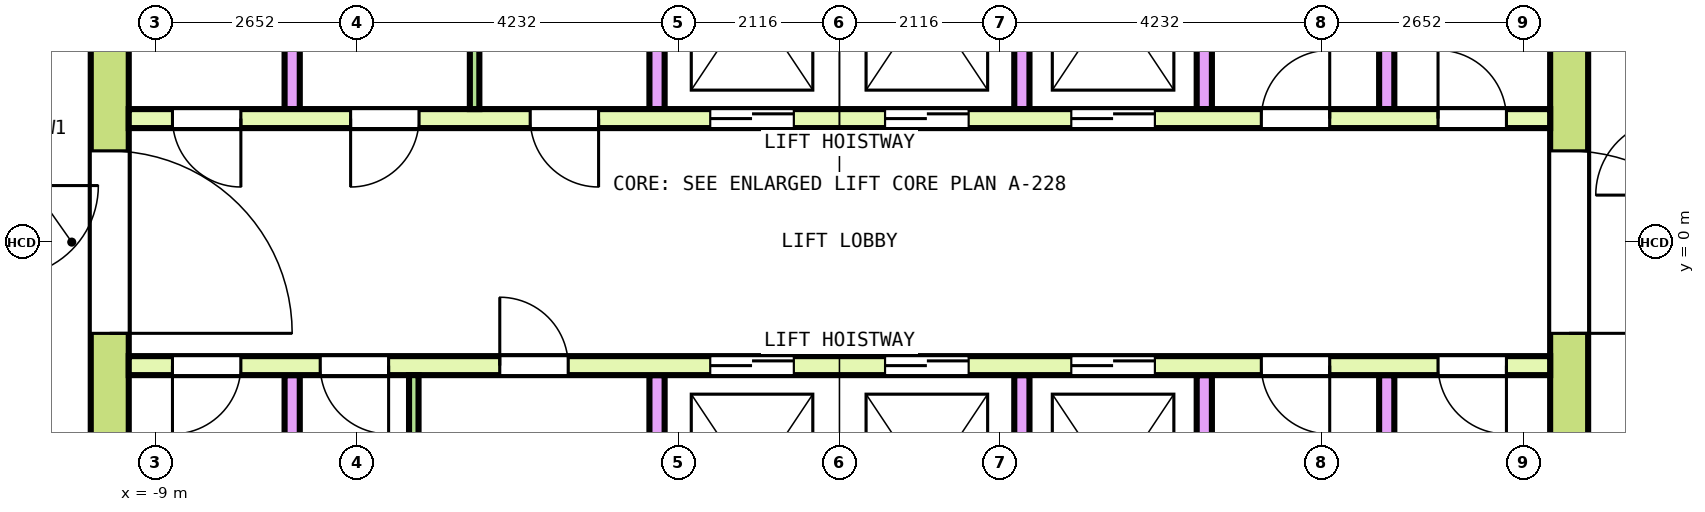
"""IFC4 building model, lengths in metres.
Left out: names, types, materials, properties, quantities, classifications, styles, units other than length and angle.
Written with IfcOpenShell. Run it as: python <this file> out.ifc"""

import sys

from ifc_helpers import new_model, si_unit, direction, frame, frame_2d, origin, place, context, subcontext, project, spatial, rectangle, extrude, element, fill, save


model = new_model("IFC4")
c1 = context("Model", 3, precision=1e-05, world=origin(), true_north=direction((0.0, 1.0)))
c2 = subcontext(c1, "Body", "Model", "MODEL_VIEW")
j1 = project(units=[si_unit("LENGTHUNIT", "METRE"), si_unit("PLANEANGLEUNIT", "RADIAN")], contexts=[c1])
p1 = place(None, origin())
s1 = spatial("IfcSite", under=j1, at=p1, CompositionType="ELEMENT")
p2 = place(p1, origin())
s2 = spatial("IfcBuilding", under=s1, at=p2, CompositionType="ELEMENT")
p3 = place(p2, frame((0.0, 0.0, 328.6)))
s3 = spatial("IfcBuildingStorey", under=s2, at=p3, CompositionType="ELEMENT", Elevation=328.6)
p4 = place(p3, frame((-9.6, -7.85, 0.0), z_axis=(0.0, 0.0, 1.0), x_axis=(0.0, 1.0, 0.0)))
e1 = element("IfcWall", 1, at=p4, inside=s3, PredefinedType="SHEAR", context=c2, shape_type="SweptSolid", body=[
    extrude(rectangle(XDim=15.7, YDim=0.5, at=frame_2d((7.85, 0.0))), origin(), (0.0, 0.0, 1.0), 3.7),
])
p5 = place(p4, frame((6.65, 0.0, 0.0)))
e2 = element("IfcOpeningElement", 2, at=p5, cuts=e1, PredefinedType="OPENING", context=c2, shape_type="SweptSolid", body=[
    extrude(rectangle(XDim=2.4, YDim=2.1, at=frame_2d((1.2, 1.05))), frame((0.0, 0.26, 0.0), z_axis=(0.0, -1.0, 0.0), x_axis=(1.0, 0.0, 0.0)), (0.0, 0.0, 1.0), 0.52),
])
p6 = place(p4, frame((13.55, 0.0, 0.0)))
e3 = element("IfcOpeningElement", 3, at=p6, cuts=e1, PredefinedType="OPENING", context=c2, shape_type="SweptSolid", body=[
    extrude(rectangle(XDim=1.2, YDim=2.1, at=frame_2d((0.6, 1.05))), frame((0.0, 0.26, 0.0), z_axis=(0.0, -1.0, 0.0), x_axis=(1.0, 0.0, 0.0)), (0.0, 0.0, 1.0), 0.52),
])
p7 = place(p4, frame((0.95, 0.0, 0.0)))
e4 = element("IfcOpeningElement", 4, at=p7, cuts=e1, PredefinedType="OPENING", context=c2, shape_type="SweptSolid", body=[
    extrude(rectangle(XDim=1.2, YDim=2.1, at=frame_2d((0.6, 1.05))), frame((0.0, 0.26, 0.0), z_axis=(0.0, -1.0, 0.0), x_axis=(1.0, 0.0, 0.0)), (0.0, 0.0, 1.0), 0.52),
])
p8 = place(p3, frame((9.6, -7.85, 0.0), z_axis=(0.0, 0.0, 1.0), x_axis=(0.0, 1.0, 0.0)))
e5 = element("IfcWall", 5, at=p8, inside=s3, PredefinedType="SHEAR", context=c2, shape_type="SweptSolid", body=[
    extrude(rectangle(XDim=15.7, YDim=0.5, at=frame_2d((7.85, 0.0))), origin(), (0.0, 0.0, 1.0), 3.7),
])
p9 = place(p8, frame((6.65, 0.0, 0.0)))
e6 = element("IfcOpeningElement", 6, at=p9, cuts=e5, PredefinedType="OPENING", context=c2, shape_type="SweptSolid", body=[
    extrude(rectangle(XDim=2.4, YDim=2.1, at=frame_2d((1.2, 1.05))), frame((0.0, 0.26, 0.0), z_axis=(0.0, -1.0, 0.0), x_axis=(1.0, 0.0, 0.0)), (0.0, 0.0, 1.0), 0.52),
])
p10 = place(p8, frame((13.55, 0.0, 0.0)))
e7 = element("IfcOpeningElement", 7, at=p10, cuts=e5, PredefinedType="OPENING", context=c2, shape_type="SweptSolid", body=[
    extrude(rectangle(XDim=1.2, YDim=2.1, at=frame_2d((0.6, 1.05))), frame((0.0, 0.26, 0.0), z_axis=(0.0, -1.0, 0.0), x_axis=(1.0, 0.0, 0.0)), (0.0, 0.0, 1.0), 0.52),
])
p11 = place(p8, frame((1.05, 0.0, 0.0)))
e8 = element("IfcOpeningElement", 8, at=p11, cuts=e5, PredefinedType="OPENING", context=c2, shape_type="SweptSolid", body=[
    extrude(rectangle(XDim=1.0, YDim=2.1, at=frame_2d((0.5, 1.05))), frame((0.0, 0.26, 0.0), z_axis=(0.0, -1.0, 0.0), x_axis=(1.0, 0.0, 0.0)), (0.0, 0.0, 1.0), 0.52),
])
p12 = place(p3, frame((-9.35, 1.625, 0.0), z_axis=(0.0, 0.0, 1.0), x_axis=(1.0, 0.0, 0.0)))
e9 = element("IfcWall", 9, at=p12, inside=s3, PredefinedType="SOLIDWALL", context=c2, shape_type="SweptSolid", body=[
    extrude(rectangle(XDim=18.7, YDim=0.25, at=frame_2d((9.35, 0.0))), origin(), (0.0, 0.0, 1.0), 3.7),
])
p13 = place(p12, frame((7.65, 0.0, 0.0)))
e10 = element("IfcOpeningElement", 10, at=p13, cuts=e9, PredefinedType="OPENING", context=c2, shape_type="SweptSolid", body=[
    extrude(rectangle(XDim=1.1, YDim=2.1, at=frame_2d((0.55, 1.05))), frame((0.0, 0.135, 0.0), z_axis=(0.0, -1.0, 0.0), x_axis=(1.0, 0.0, 0.0)), (0.0, 0.0, 1.0), 0.27),
])
p14 = place(p12, frame((9.95, 0.0, 0.0)))
e11 = element("IfcOpeningElement", 11, at=p14, cuts=e9, PredefinedType="OPENING", context=c2, shape_type="SweptSolid", body=[
    extrude(rectangle(XDim=1.1, YDim=2.1, at=frame_2d((0.55, 1.05))), frame((0.0, 0.135, 0.0), z_axis=(0.0, -1.0, 0.0), x_axis=(1.0, 0.0, 0.0)), (0.0, 0.0, 1.0), 0.27),
])
p15 = place(p12, frame((12.4, 0.0, 0.0)))
e12 = element("IfcOpeningElement", 12, at=p15, cuts=e9, PredefinedType="OPENING", context=c2, shape_type="SweptSolid", body=[
    extrude(rectangle(XDim=1.1, YDim=2.1, at=frame_2d((0.55, 1.05))), frame((0.0, 0.135, 0.0), z_axis=(0.0, -1.0, 0.0), x_axis=(1.0, 0.0, 0.0)), (0.0, 0.0, 1.0), 0.27),
])
p16 = place(p12, frame((0.575, 0.0, 0.0)))
e13 = element("IfcOpeningElement", 13, at=p16, cuts=e9, PredefinedType="OPENING", context=c2, shape_type="SweptSolid", body=[
    extrude(rectangle(XDim=0.9, YDim=2.1, at=frame_2d((0.45, 1.05))), frame((0.0, 0.135, 0.0), z_axis=(0.0, -1.0, 0.0), x_axis=(1.0, 0.0, 0.0)), (0.0, 0.0, 1.0), 0.27),
])
p17 = place(p12, frame((2.919, 0.0, 0.0)))
e14 = element("IfcOpeningElement", 14, at=p17, cuts=e9, PredefinedType="OPENING", context=c2, shape_type="SweptSolid", body=[
    extrude(rectangle(XDim=0.9, YDim=2.1, at=frame_2d((0.45, 1.05))), frame((0.0, 0.135, 0.0), z_axis=(0.0, -1.0, 0.0), x_axis=(1.0, 0.0, 0.0)), (0.0, 0.0, 1.0), 0.27),
])
p18 = place(p12, frame((5.281, 0.0, 0.0)))
e15 = element("IfcOpeningElement", 15, at=p18, cuts=e9, PredefinedType="OPENING", context=c2, shape_type="SweptSolid", body=[
    extrude(rectangle(XDim=0.9, YDim=2.1, at=frame_2d((0.45, 1.05))), frame((0.0, 0.135, 0.0), z_axis=(0.0, -1.0, 0.0), x_axis=(1.0, 0.0, 0.0)), (0.0, 0.0, 1.0), 0.27),
])
p19 = place(p12, frame((14.9, 0.0, 0.0)))
e16 = element("IfcOpeningElement", 16, at=p19, cuts=e9, PredefinedType="OPENING", context=c2, shape_type="SweptSolid", body=[
    extrude(rectangle(XDim=0.9, YDim=2.1, at=frame_2d((0.45, 1.05))), frame((0.0, 0.135, 0.0), z_axis=(0.0, -1.0, 0.0), x_axis=(1.0, 0.0, 0.0)), (0.0, 0.0, 1.0), 0.27),
])
p20 = place(p12, frame((17.225, 0.0, 0.0)))
e17 = element("IfcOpeningElement", 17, at=p20, cuts=e9, PredefinedType="OPENING", context=c2, shape_type="SweptSolid", body=[
    extrude(rectangle(XDim=0.9, YDim=2.1, at=frame_2d((0.45, 1.05))), frame((0.0, 0.135, 0.0), z_axis=(0.0, -1.0, 0.0), x_axis=(1.0, 0.0, 0.0)), (0.0, 0.0, 1.0), 0.27),
])
for number, where, z_axis, x_axis in (
    (18, (-7.2, 1.75, 0.0), (0.0, 0.0, 1.0), (0.0, 1.0, 0.0)),
    (19, (-2.4, 1.75, 0.0), (0.0, 0.0, 1.0), (0.0, 1.0, 0.0)),
    (20, (2.4, 1.75, 0.0), (0.0, 0.0, 1.0), (0.0, 1.0, 0.0)),
    (21, (4.8, 1.75, 0.0), (0.0, 0.0, 1.0), (0.0, 1.0, 0.0)),
    (22, (7.2, 1.75, 0.0), (0.0, 0.0, 1.0), (0.0, 1.0, 0.0)),
):
    element("IfcWall", number, at=place(p3, frame(where, z_axis=z_axis, x_axis=x_axis)), inside=s3, PredefinedType="SOLIDWALL", context=c2, shape_type="SweptSolid", body=[
        extrude(rectangle(XDim=2.9, YDim=0.2, at=frame_2d((1.45, 0.0))), origin(), (0.0, 0.0, 1.0), 3.7),
    ])
p21 = place(p3, frame((-9.35, -1.625, 0.0), z_axis=(0.0, 0.0, 1.0), x_axis=(1.0, 0.0, 0.0)))
e23 = element("IfcWall", 23, at=p21, inside=s3, PredefinedType="SOLIDWALL", context=c2, shape_type="SweptSolid", body=[
    extrude(rectangle(XDim=18.7, YDim=0.25, at=frame_2d((9.35, 0.0))), origin(), (0.0, 0.0, 1.0), 3.7),
])
p22 = place(p21, frame((7.65, 0.0, 0.0)))
e24 = element("IfcOpeningElement", 24, at=p22, cuts=e23, PredefinedType="OPENING", context=c2, shape_type="SweptSolid", body=[
    extrude(rectangle(XDim=1.1, YDim=2.1, at=frame_2d((0.55, 1.05))), frame((0.0, 0.135, 0.0), z_axis=(0.0, -1.0, 0.0), x_axis=(1.0, 0.0, 0.0)), (0.0, 0.0, 1.0), 0.27),
])
p23 = place(p21, frame((9.95, 0.0, 0.0)))
e25 = element("IfcOpeningElement", 25, at=p23, cuts=e23, PredefinedType="OPENING", context=c2, shape_type="SweptSolid", body=[
    extrude(rectangle(XDim=1.1, YDim=2.1, at=frame_2d((0.55, 1.05))), frame((0.0, 0.135, 0.0), z_axis=(0.0, -1.0, 0.0), x_axis=(1.0, 0.0, 0.0)), (0.0, 0.0, 1.0), 0.27),
])
p24 = place(p21, frame((12.4, 0.0, 0.0)))
e26 = element("IfcOpeningElement", 26, at=p24, cuts=e23, PredefinedType="OPENING", context=c2, shape_type="SweptSolid", body=[
    extrude(rectangle(XDim=1.1, YDim=2.1, at=frame_2d((0.55, 1.05))), frame((0.0, 0.135, 0.0), z_axis=(0.0, -1.0, 0.0), x_axis=(1.0, 0.0, 0.0)), (0.0, 0.0, 1.0), 0.27),
])
p25 = place(p21, frame((0.575, 0.0, 0.0)))
e27 = element("IfcOpeningElement", 27, at=p25, cuts=e23, PredefinedType="OPENING", context=c2, shape_type="SweptSolid", body=[
    extrude(rectangle(XDim=0.9, YDim=2.1, at=frame_2d((0.45, 1.05))), frame((0.0, 0.135, 0.0), z_axis=(0.0, -1.0, 0.0), x_axis=(1.0, 0.0, 0.0)), (0.0, 0.0, 1.0), 0.27),
])
p26 = place(p21, frame((2.519, 0.0, 0.0)))
e28 = element("IfcOpeningElement", 28, at=p26, cuts=e23, PredefinedType="OPENING", context=c2, shape_type="SweptSolid", body=[
    extrude(rectangle(XDim=0.9, YDim=2.1, at=frame_2d((0.45, 1.05))), frame((0.0, 0.135, 0.0), z_axis=(0.0, -1.0, 0.0), x_axis=(1.0, 0.0, 0.0)), (0.0, 0.0, 1.0), 0.27),
])
p27 = place(p21, frame((4.881, 0.0, 0.0)))
e29 = element("IfcOpeningElement", 29, at=p27, cuts=e23, PredefinedType="OPENING", context=c2, shape_type="SweptSolid", body=[
    extrude(rectangle(XDim=0.9, YDim=2.1, at=frame_2d((0.45, 1.05))), frame((0.0, 0.135, 0.0), z_axis=(0.0, -1.0, 0.0), x_axis=(1.0, 0.0, 0.0)), (0.0, 0.0, 1.0), 0.27),
])
p28 = place(p21, frame((14.9, 0.0, 0.0)))
e30 = element("IfcOpeningElement", 30, at=p28, cuts=e23, PredefinedType="OPENING", context=c2, shape_type="SweptSolid", body=[
    extrude(rectangle(XDim=0.9, YDim=2.1, at=frame_2d((0.45, 1.05))), frame((0.0, 0.135, 0.0), z_axis=(0.0, -1.0, 0.0), x_axis=(1.0, 0.0, 0.0)), (0.0, 0.0, 1.0), 0.27),
])
p29 = place(p21, frame((17.225, 0.0, 0.0)))
e31 = element("IfcOpeningElement", 31, at=p29, cuts=e23, PredefinedType="OPENING", context=c2, shape_type="SweptSolid", body=[
    extrude(rectangle(XDim=0.9, YDim=2.1, at=frame_2d((0.45, 1.05))), frame((0.0, 0.135, 0.0), z_axis=(0.0, -1.0, 0.0), x_axis=(1.0, 0.0, 0.0)), (0.0, 0.0, 1.0), 0.27),
])
for number, where, z_axis, x_axis in (
    (32, (-7.2, -4.65, 0.0), (0.0, 0.0, 1.0), (0.0, 1.0, 0.0)),
    (33, (-2.4, -4.65, 0.0), (0.0, 0.0, 1.0), (0.0, 1.0, 0.0)),
    (34, (2.4, -4.65, 0.0), (0.0, 0.0, 1.0), (0.0, 1.0, 0.0)),
    (35, (4.8, -4.65, 0.0), (0.0, 0.0, 1.0), (0.0, 1.0, 0.0)),
    (36, (7.2, -4.65, 0.0), (0.0, 0.0, 1.0), (0.0, 1.0, 0.0)),
):
    element("IfcWall", number, at=place(p3, frame(where, z_axis=z_axis, x_axis=x_axis)), inside=s3, PredefinedType="SOLIDWALL", context=c2, shape_type="SweptSolid", body=[
        extrude(rectangle(XDim=2.9, YDim=0.2, at=frame_2d((1.45, 0.0))), origin(), (0.0, 0.0, 1.0), 3.7),
    ])
for number, where, z_axis, x_axis in (
    (37, (-4.8, 1.75, 0.0), (0.0, 0.0, 1.0), (0.0, 1.0, 0.0)),
    (38, (-5.6, -4.65, 0.0), (0.0, 0.0, 1.0), (0.0, 1.0, 0.0)),
):
    element("IfcWall", number, at=place(p3, frame(where, z_axis=z_axis, x_axis=x_axis)), inside=s3, PredefinedType="PARTITIONING", context=c2, shape_type="SweptSolid", body=[
        extrude(rectangle(XDim=2.9, YDim=0.125, at=frame_2d((1.45, 0.0))), origin(), (0.0, 0.0, 1.0), 3.7),
    ])
p30 = place(p13, origin())
e39 = element("IfcDoor", 39, at=p30, inside=s3, OperationType="DOUBLE_DOOR_SLIDING", PredefinedType="DOOR", context=c2, shape_type="SweptSolid", body=[
    extrude(rectangle(XDim=1.1, YDim=2.1, at=frame_2d((0.55, 1.05))), frame((0.0, 0.075, 0.0), z_axis=(0.0, -1.0, 0.0), x_axis=(1.0, 0.0, 0.0)), (0.0, 0.0, 1.0), 0.15),
])
fill(e10, e39)
p31 = place(p14, origin())
e40 = element("IfcDoor", 40, at=p31, inside=s3, OperationType="DOUBLE_DOOR_SLIDING", PredefinedType="DOOR", context=c2, shape_type="SweptSolid", body=[
    extrude(rectangle(XDim=1.1, YDim=2.1, at=frame_2d((0.55, 1.05))), frame((0.0, 0.075, 0.0), z_axis=(0.0, -1.0, 0.0), x_axis=(1.0, 0.0, 0.0)), (0.0, 0.0, 1.0), 0.15),
])
fill(e11, e40)
p32 = place(p15, origin())
e41 = element("IfcDoor", 41, at=p32, inside=s3, OperationType="DOUBLE_DOOR_SLIDING", PredefinedType="DOOR", context=c2, shape_type="SweptSolid", body=[
    extrude(rectangle(XDim=1.1, YDim=2.1, at=frame_2d((0.55, 1.05))), frame((0.0, 0.075, 0.0), z_axis=(0.0, -1.0, 0.0), x_axis=(1.0, 0.0, 0.0)), (0.0, 0.0, 1.0), 0.15),
])
fill(e12, e41)
p33 = place(p22, origin())
e42 = element("IfcDoor", 42, at=p33, inside=s3, OperationType="DOUBLE_DOOR_SLIDING", PredefinedType="DOOR", context=c2, shape_type="SweptSolid", body=[
    extrude(rectangle(XDim=1.1, YDim=2.1, at=frame_2d((0.55, 1.05))), frame((0.0, 0.075, 0.0), z_axis=(0.0, -1.0, 0.0), x_axis=(1.0, 0.0, 0.0)), (0.0, 0.0, 1.0), 0.15),
])
fill(e24, e42)
p34 = place(p23, origin())
e43 = element("IfcDoor", 43, at=p34, inside=s3, OperationType="DOUBLE_DOOR_SLIDING", PredefinedType="DOOR", context=c2, shape_type="SweptSolid", body=[
    extrude(rectangle(XDim=1.1, YDim=2.1, at=frame_2d((0.55, 1.05))), frame((0.0, 0.075, 0.0), z_axis=(0.0, -1.0, 0.0), x_axis=(1.0, 0.0, 0.0)), (0.0, 0.0, 1.0), 0.15),
])
fill(e25, e43)
p35 = place(p24, origin())
e44 = element("IfcDoor", 44, at=p35, inside=s3, OperationType="DOUBLE_DOOR_SLIDING", PredefinedType="DOOR", context=c2, shape_type="SweptSolid", body=[
    extrude(rectangle(XDim=1.1, YDim=2.1, at=frame_2d((0.55, 1.05))), frame((0.0, 0.075, 0.0), z_axis=(0.0, -1.0, 0.0), x_axis=(1.0, 0.0, 0.0)), (0.0, 0.0, 1.0), 0.15),
])
fill(e26, e44)
p36 = place(p5, origin())
e45 = element("IfcDoor", 45, at=p36, inside=s3, OperationType="DOUBLE_DOOR_SINGLE_SWING", PredefinedType="DOOR", context=c2, shape_type="SweptSolid", body=[
    extrude(rectangle(XDim=2.4, YDim=2.1, at=frame_2d((1.2, 1.05))), frame((0.0, 0.2, 0.0), z_axis=(0.0, -1.0, 0.0), x_axis=(1.0, 0.0, 0.0)), (0.0, 0.0, 1.0), 0.4),
])
fill(e2, e45)
p37 = place(p9, origin())
e46 = element("IfcDoor", 46, at=p37, inside=s3, OperationType="DOUBLE_DOOR_SINGLE_SWING", PredefinedType="DOOR", context=c2, shape_type="SweptSolid", body=[
    extrude(rectangle(XDim=2.4, YDim=2.1, at=frame_2d((1.2, 1.05))), frame((0.0, 0.2, 0.0), z_axis=(0.0, -1.0, 0.0), x_axis=(1.0, 0.0, 0.0)), (0.0, 0.0, 1.0), 0.4),
])
fill(e6, e46)
p38 = place(p16, origin())
e47 = element("IfcDoor", 47, at=p38, inside=s3, OperationType="SINGLE_SWING_RIGHT", PredefinedType="DOOR", context=c2, shape_type="SweptSolid", body=[
    extrude(rectangle(XDim=0.9, YDim=2.1, at=frame_2d((0.45, 1.05))), frame((0.0, 0.075, 0.0), z_axis=(0.0, -1.0, 0.0), x_axis=(1.0, 0.0, 0.0)), (0.0, 0.0, 1.0), 0.15),
])
fill(e13, e47)
p39 = place(p17, origin())
e48 = element("IfcDoor", 48, at=p39, inside=s3, OperationType="SINGLE_SWING_LEFT", PredefinedType="DOOR", context=c2, shape_type="SweptSolid", body=[
    extrude(rectangle(XDim=0.9, YDim=2.1, at=frame_2d((0.45, 1.05))), frame((0.0, 0.075, 0.0), z_axis=(0.0, -1.0, 0.0), x_axis=(1.0, 0.0, 0.0)), (0.0, 0.0, 1.0), 0.15),
])
fill(e14, e48)
p40 = place(p18, origin())
e49 = element("IfcDoor", 49, at=p40, inside=s3, OperationType="SINGLE_SWING_RIGHT", PredefinedType="DOOR", context=c2, shape_type="SweptSolid", body=[
    extrude(rectangle(XDim=0.9, YDim=2.1, at=frame_2d((0.45, 1.05))), frame((0.0, 0.075, 0.0), z_axis=(0.0, -1.0, 0.0), x_axis=(1.0, 0.0, 0.0)), (0.0, 0.0, 1.0), 0.15),
])
fill(e15, e49)
p41 = place(p19, origin())
e50 = element("IfcDoor", 50, at=p41, inside=s3, OperationType="SINGLE_SWING_LEFT", PredefinedType="DOOR", context=c2, shape_type="SweptSolid", body=[
    extrude(rectangle(XDim=0.9, YDim=2.1, at=frame_2d((0.45, 1.05))), frame((0.0, 0.075, 0.0), z_axis=(0.0, -1.0, 0.0), x_axis=(1.0, 0.0, 0.0)), (0.0, 0.0, 1.0), 0.15),
])
fill(e16, e50)
p42 = place(p20, origin())
e51 = element("IfcDoor", 51, at=p42, inside=s3, OperationType="SINGLE_SWING_RIGHT", PredefinedType="DOOR", context=c2, shape_type="SweptSolid", body=[
    extrude(rectangle(XDim=0.9, YDim=2.1, at=frame_2d((0.45, 1.05))), frame((0.0, 0.075, 0.0), z_axis=(0.0, -1.0, 0.0), x_axis=(1.0, 0.0, 0.0)), (0.0, 0.0, 1.0), 0.15),
])
fill(e17, e51)
p43 = place(p25, origin())
e52 = element("IfcDoor", 52, at=p43, inside=s3, OperationType="SINGLE_SWING_LEFT", PredefinedType="DOOR", context=c2, shape_type="SweptSolid", body=[
    extrude(rectangle(XDim=0.9, YDim=2.1, at=frame_2d((0.45, 1.05))), frame((0.0, 0.075, 0.0), z_axis=(0.0, -1.0, 0.0), x_axis=(1.0, 0.0, 0.0)), (0.0, 0.0, 1.0), 0.15),
])
fill(e27, e52)
p44 = place(p26, origin())
e53 = element("IfcDoor", 53, at=p44, inside=s3, OperationType="SINGLE_SWING_RIGHT", PredefinedType="DOOR", context=c2, shape_type="SweptSolid", body=[
    extrude(rectangle(XDim=0.9, YDim=2.1, at=frame_2d((0.45, 1.05))), frame((0.0, 0.075, 0.0), z_axis=(0.0, -1.0, 0.0), x_axis=(1.0, 0.0, 0.0)), (0.0, 0.0, 1.0), 0.15),
])
fill(e28, e53)
p45 = place(p27, origin())
e54 = element("IfcDoor", 54, at=p45, inside=s3, OperationType="SINGLE_SWING_LEFT", PredefinedType="DOOR", context=c2, shape_type="SweptSolid", body=[
    extrude(rectangle(XDim=0.9, YDim=2.1, at=frame_2d((0.45, 1.05))), frame((0.0, 0.075, 0.0), z_axis=(0.0, -1.0, 0.0), x_axis=(1.0, 0.0, 0.0)), (0.0, 0.0, 1.0), 0.15),
])
fill(e29, e54)
p46 = place(p28, origin())
e55 = element("IfcDoor", 55, at=p46, inside=s3, OperationType="SINGLE_SWING_RIGHT", PredefinedType="DOOR", context=c2, shape_type="SweptSolid", body=[
    extrude(rectangle(XDim=0.9, YDim=2.1, at=frame_2d((0.45, 1.05))), frame((0.0, 0.075, 0.0), z_axis=(0.0, -1.0, 0.0), x_axis=(1.0, 0.0, 0.0)), (0.0, 0.0, 1.0), 0.15),
])
fill(e30, e55)
p47 = place(p29, origin())
e56 = element("IfcDoor", 56, at=p47, inside=s3, OperationType="SINGLE_SWING_LEFT", PredefinedType="DOOR", context=c2, shape_type="SweptSolid", body=[
    extrude(rectangle(XDim=0.9, YDim=2.1, at=frame_2d((0.45, 1.05))), frame((0.0, 0.075, 0.0), z_axis=(0.0, -1.0, 0.0), x_axis=(1.0, 0.0, 0.0)), (0.0, 0.0, 1.0), 0.15),
])
fill(e31, e56)
save(model, sys.argv[1])
